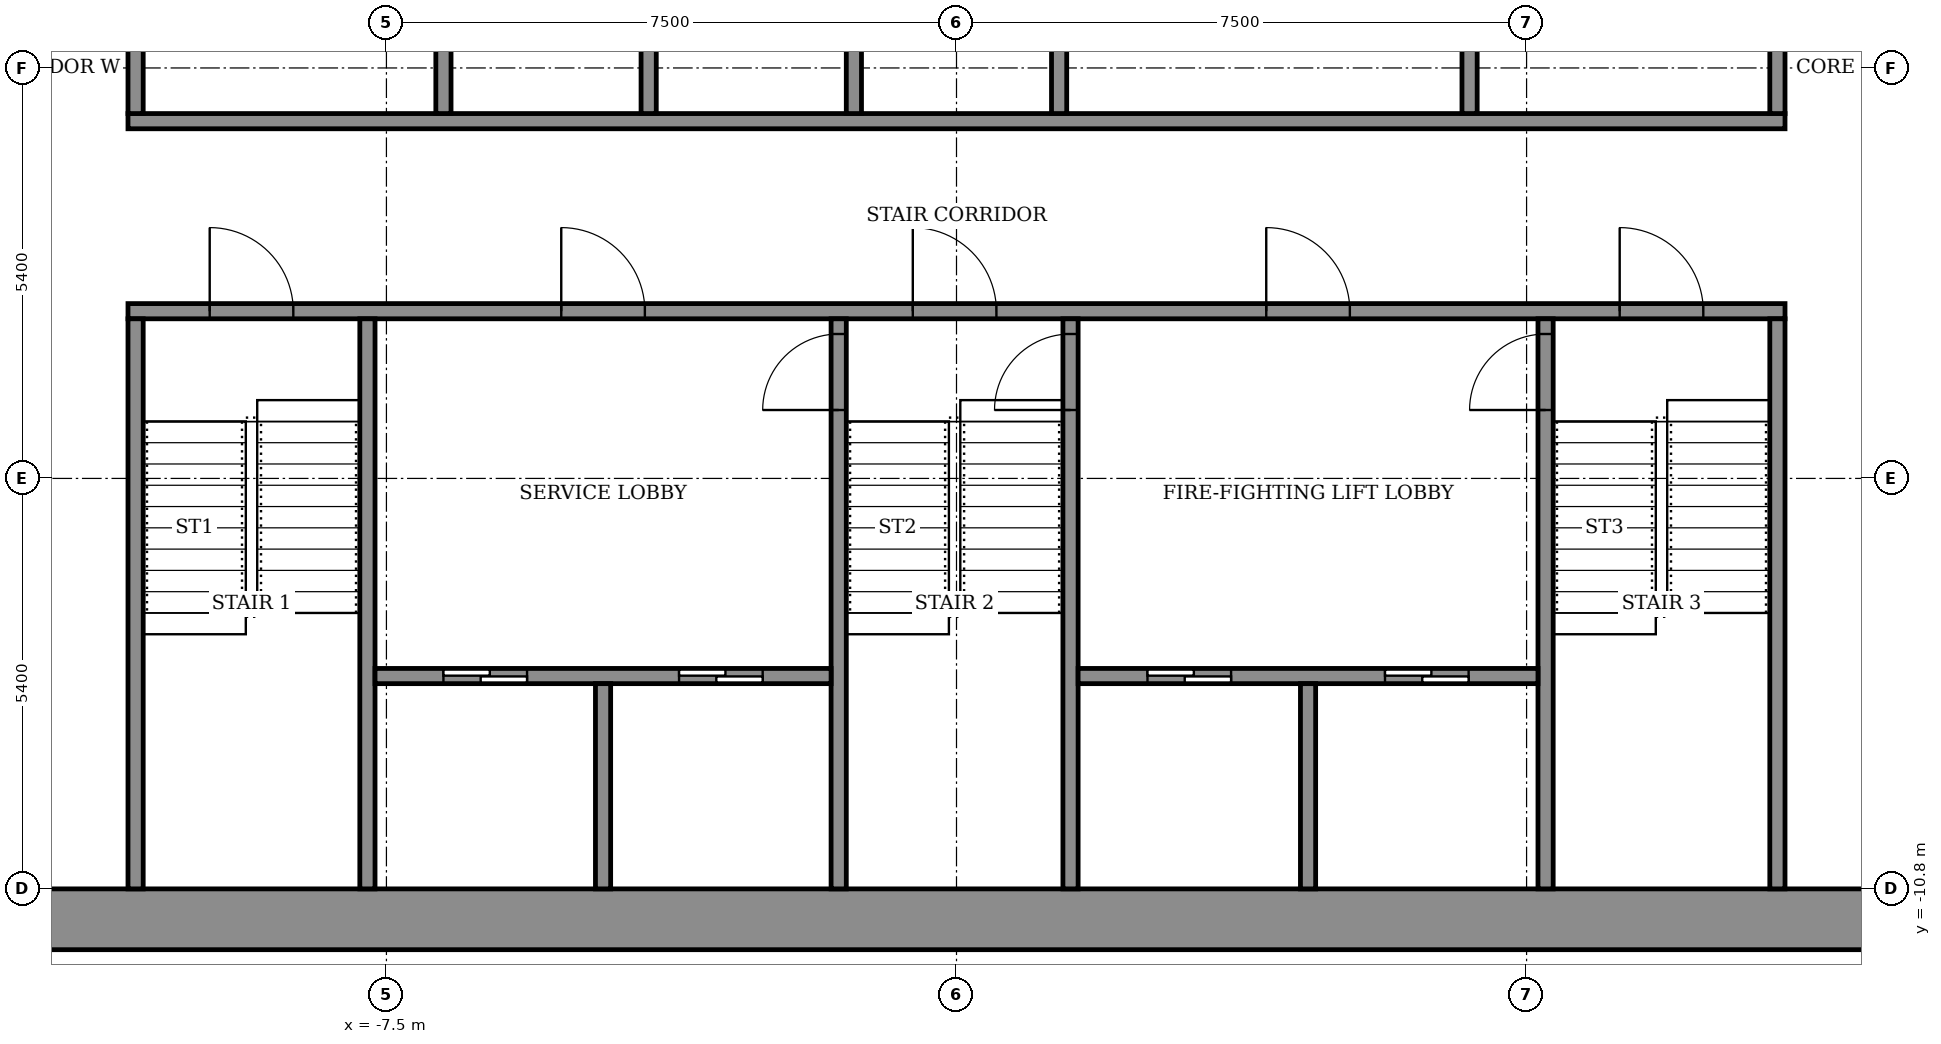
"""IFC4 building model, lengths in metres.
Left out: names, types, materials, properties, quantities, classifications, styles, units other than length and angle.
Written with IfcOpenShell. Run it as: python <this file> out.ifc"""

import sys

from ifc_helpers import new_model, si_unit, direction, frame, frame_2d, origin, place, context, subcontext, project, spatial, rectangle, extrude, element, fill, save


model = new_model("IFC4")
c1 = context("Model", 3, precision=1e-05, world=origin(), true_north=direction((0.0, 1.0)))
c2 = subcontext(c1, "Body", "Model", "MODEL_VIEW")
j1 = project(units=[si_unit("LENGTHUNIT", "METRE"), si_unit("PLANEANGLEUNIT", "RADIAN")], contexts=[c1])
p1 = place(None, origin())
s1 = spatial("IfcSite", under=j1, at=p1, CompositionType="ELEMENT")
p2 = place(p1, origin())
s2 = spatial("IfcBuilding", under=s1, at=p2, CompositionType="ELEMENT")
p3 = place(p2, frame((0.0, 0.0, 245.5)))
s3 = spatial("IfcBuildingStorey", under=s2, at=p3, CompositionType="ELEMENT", Elevation=245.5)
p4 = place(p3, frame((-14.6, -11.2, 0.0), z_axis=(0.0, 0.0, 1.0), x_axis=(1.0, 0.0, 0.0)))
e1 = element("IfcWall", 1, at=p4, inside=s3, PredefinedType="SHEAR", context=c2, shape_type="SweptSolid", body=[
    extrude(rectangle(XDim=29.2, YDim=0.8, at=frame_2d((14.6, 0.0))), origin(), (0.0, 0.0, 1.0), 3.6),
])
p5 = place(p3, frame((-10.9, -3.2, 0.0), z_axis=(0.0, 0.0, 1.0), x_axis=(1.0, 0.0, 0.0)))
e2 = element("IfcWall", 2, at=p5, inside=s3, PredefinedType="SHEAR", context=c2, shape_type="SweptSolid", body=[
    extrude(rectangle(XDim=21.8, YDim=0.2, at=frame_2d((10.9, 0.0))), origin(), (0.0, 0.0, 1.0), 3.05),
])
p6 = place(p5, frame((1.075, 0.0, 0.0)))
e3 = element("IfcOpeningElement", 3, at=p6, cuts=e2, PredefinedType="OPENING", context=c2, shape_type="SweptSolid", body=[
    extrude(rectangle(XDim=1.1, YDim=2.1, at=frame_2d((0.55, 1.05))), frame((0.0, 0.11, 0.0), z_axis=(0.0, -1.0, 0.0), x_axis=(1.0, 0.0, 0.0)), (0.0, 0.0, 1.0), 0.22),
])
p7 = place(p5, frame((10.325, 0.0, 0.0)))
e4 = element("IfcOpeningElement", 4, at=p7, cuts=e2, PredefinedType="OPENING", context=c2, shape_type="SweptSolid", body=[
    extrude(rectangle(XDim=1.1, YDim=2.1, at=frame_2d((0.55, 1.05))), frame((0.0, 0.11, 0.0), z_axis=(0.0, -1.0, 0.0), x_axis=(1.0, 0.0, 0.0)), (0.0, 0.0, 1.0), 0.22),
])
p8 = place(p5, frame((19.625, 0.0, 0.0)))
e5 = element("IfcOpeningElement", 5, at=p8, cuts=e2, PredefinedType="OPENING", context=c2, shape_type="SweptSolid", body=[
    extrude(rectangle(XDim=1.1, YDim=2.1, at=frame_2d((0.55, 1.05))), frame((0.0, 0.11, 0.0), z_axis=(0.0, -1.0, 0.0), x_axis=(1.0, 0.0, 0.0)), (0.0, 0.0, 1.0), 0.22),
])
p9 = place(p5, frame((5.7, 0.0, 0.0)))
e6 = element("IfcOpeningElement", 6, at=p9, cuts=e2, PredefinedType="OPENING", context=c2, shape_type="SweptSolid", body=[
    extrude(rectangle(XDim=1.1, YDim=2.1, at=frame_2d((0.55, 1.05))), frame((0.0, 0.11, 0.0), z_axis=(0.0, -1.0, 0.0), x_axis=(1.0, 0.0, 0.0)), (0.0, 0.0, 1.0), 0.22),
])
p10 = place(p5, frame((14.975, 0.0, 0.0)))
e7 = element("IfcOpeningElement", 7, at=p10, cuts=e2, PredefinedType="OPENING", context=c2, shape_type="SweptSolid", body=[
    extrude(rectangle(XDim=1.1, YDim=2.1, at=frame_2d((0.55, 1.05))), frame((0.0, 0.11, 0.0), z_axis=(0.0, -1.0, 0.0), x_axis=(1.0, 0.0, 0.0)), (0.0, 0.0, 1.0), 0.22),
])
p11 = place(p3, frame((-10.9, -0.7, 0.0), z_axis=(0.0, 0.0, 1.0), x_axis=(1.0, 0.0, 0.0)))
e8 = element("IfcWall", 8, at=p11, inside=s3, PredefinedType="SHEAR", context=c2, shape_type="SweptSolid", body=[
    extrude(rectangle(XDim=21.8, YDim=0.2, at=frame_2d((10.9, 0.0))), origin(), (0.0, 0.0, 1.0), 3.05),
])
for number, where, z_axis, x_axis in (
    (9, (-10.8, -10.8, 0.0), (0.0, 0.0, 1.0), (0.0, 1.0, 0.0)),
    (10, (-7.75, -10.8, 0.0), (0.0, 0.0, 1.0), (0.0, 1.0, 0.0)),
):
    element("IfcWall", number, at=place(p3, frame(where, z_axis=z_axis, x_axis=x_axis)), inside=s3, PredefinedType="SHEAR", context=c2, shape_type="SweptSolid", body=[
        extrude(rectangle(XDim=7.5, YDim=0.2, at=frame_2d((3.75, 0.0))), origin(), (0.0, 0.0, 1.0), 3.05),
    ])
p12 = place(p3, frame((-1.55, -10.8, 0.0), z_axis=(0.0, 0.0, 1.0), x_axis=(0.0, 1.0, 0.0)))
e11 = element("IfcWall", 11, at=p12, inside=s3, PredefinedType="SHEAR", context=c2, shape_type="SweptSolid", body=[
    extrude(rectangle(XDim=7.5, YDim=0.2, at=frame_2d((3.75, 0.0))), origin(), (0.0, 0.0, 1.0), 3.05),
])
p13 = place(p12, frame((6.3, 0.0, 0.0)))
e12 = element("IfcOpeningElement", 12, at=p13, cuts=e11, PredefinedType="OPENING", context=c2, shape_type="SweptSolid", body=[
    extrude(rectangle(XDim=1.0, YDim=2.1, at=frame_2d((0.5, 1.05))), frame((0.0, 0.11, 0.0), z_axis=(0.0, -1.0, 0.0), x_axis=(1.0, 0.0, 0.0)), (0.0, 0.0, 1.0), 0.22),
])
p14 = place(p3, frame((1.5, -10.8, 0.0), z_axis=(0.0, 0.0, 1.0), x_axis=(0.0, 1.0, 0.0)))
e13 = element("IfcWall", 13, at=p14, inside=s3, PredefinedType="SHEAR", context=c2, shape_type="SweptSolid", body=[
    extrude(rectangle(XDim=7.5, YDim=0.2, at=frame_2d((3.75, 0.0))), origin(), (0.0, 0.0, 1.0), 3.05),
])
p15 = place(p14, frame((6.3, 0.0, 0.0)))
e14 = element("IfcOpeningElement", 14, at=p15, cuts=e13, PredefinedType="OPENING", context=c2, shape_type="SweptSolid", body=[
    extrude(rectangle(XDim=1.0, YDim=2.1, at=frame_2d((0.5, 1.05))), frame((0.0, 0.11, 0.0), z_axis=(0.0, -1.0, 0.0), x_axis=(1.0, 0.0, 0.0)), (0.0, 0.0, 1.0), 0.22),
])
p16 = place(p3, frame((7.75, -10.8, 0.0), z_axis=(0.0, 0.0, 1.0), x_axis=(0.0, 1.0, 0.0)))
e15 = element("IfcWall", 15, at=p16, inside=s3, PredefinedType="SHEAR", context=c2, shape_type="SweptSolid", body=[
    extrude(rectangle(XDim=7.5, YDim=0.2, at=frame_2d((3.75, 0.0))), origin(), (0.0, 0.0, 1.0), 3.05),
])
p17 = place(p16, frame((6.3, 0.0, 0.0)))
e16 = element("IfcOpeningElement", 16, at=p17, cuts=e15, PredefinedType="OPENING", context=c2, shape_type="SweptSolid", body=[
    extrude(rectangle(XDim=1.0, YDim=2.1, at=frame_2d((0.5, 1.05))), frame((0.0, 0.11, 0.0), z_axis=(0.0, -1.0, 0.0), x_axis=(1.0, 0.0, 0.0)), (0.0, 0.0, 1.0), 0.22),
])
p18 = place(p3, frame((10.8, -10.8, 0.0), z_axis=(0.0, 0.0, 1.0), x_axis=(0.0, 1.0, 0.0)))
e17 = element("IfcWall", 17, at=p18, inside=s3, PredefinedType="SHEAR", context=c2, shape_type="SweptSolid", body=[
    extrude(rectangle(XDim=7.5, YDim=0.2, at=frame_2d((3.75, 0.0))), origin(), (0.0, 0.0, 1.0), 3.05),
])
p19 = place(p3, frame((-7.65, -8.0, 0.0), z_axis=(0.0, 0.0, 1.0), x_axis=(1.0, 0.0, 0.0)))
e18 = element("IfcWall", 18, at=p19, inside=s3, PredefinedType="SHEAR", context=c2, shape_type="SweptSolid", body=[
    extrude(rectangle(XDim=6.0, YDim=0.2, at=frame_2d((3.0, 0.0))), origin(), (0.0, 0.0, 1.0), 3.05),
])
p20 = place(p19, frame((0.9, 0.0, 0.0)))
e19 = element("IfcOpeningElement", 19, at=p20, cuts=e18, PredefinedType="OPENING", context=c2, shape_type="SweptSolid", body=[
    extrude(rectangle(XDim=1.1, YDim=2.1, at=frame_2d((0.55, 1.05))), frame((0.0, 0.11, 0.0), z_axis=(0.0, -1.0, 0.0), x_axis=(1.0, 0.0, 0.0)), (0.0, 0.0, 1.0), 0.22),
])
p21 = place(p19, frame((4.0, 0.0, 0.0)))
e20 = element("IfcOpeningElement", 20, at=p21, cuts=e18, PredefinedType="OPENING", context=c2, shape_type="SweptSolid", body=[
    extrude(rectangle(XDim=1.1, YDim=2.1, at=frame_2d((0.55, 1.05))), frame((0.0, 0.11, 0.0), z_axis=(0.0, -1.0, 0.0), x_axis=(1.0, 0.0, 0.0)), (0.0, 0.0, 1.0), 0.22),
])
p22 = place(p3, frame((-4.65, -10.8, 0.0), z_axis=(0.0, 0.0, 1.0), x_axis=(0.0, 1.0, 0.0)))
e21 = element("IfcWall", 21, at=p22, inside=s3, PredefinedType="SHEAR", context=c2, shape_type="SweptSolid", body=[
    extrude(rectangle(XDim=2.7, YDim=0.2, at=frame_2d((1.35, 0.0))), origin(), (0.0, 0.0, 1.0), 3.05),
])
p23 = place(p3, frame((1.6, -8.0, 0.0), z_axis=(0.0, 0.0, 1.0), x_axis=(1.0, 0.0, 0.0)))
e22 = element("IfcWall", 22, at=p23, inside=s3, PredefinedType="SHEAR", context=c2, shape_type="SweptSolid", body=[
    extrude(rectangle(XDim=6.05, YDim=0.2, at=frame_2d((3.025, 0.0))), origin(), (0.0, 0.0, 1.0), 3.05),
])
p24 = place(p23, frame((0.913, 0.0, 0.0)))
e23 = element("IfcOpeningElement", 23, at=p24, cuts=e22, PredefinedType="OPENING", context=c2, shape_type="SweptSolid", body=[
    extrude(rectangle(XDim=1.1, YDim=2.1, at=frame_2d((0.55, 1.05))), frame((0.0, 0.11, 0.0), z_axis=(0.0, -1.0, 0.0), x_axis=(1.0, 0.0, 0.0)), (0.0, 0.0, 1.0), 0.22),
])
p25 = place(p23, frame((4.038, 0.0, 0.0)))
e24 = element("IfcOpeningElement", 24, at=p25, cuts=e22, PredefinedType="OPENING", context=c2, shape_type="SweptSolid", body=[
    extrude(rectangle(XDim=1.1, YDim=2.1, at=frame_2d((0.55, 1.05))), frame((0.0, 0.11, 0.0), z_axis=(0.0, -1.0, 0.0), x_axis=(1.0, 0.0, 0.0)), (0.0, 0.0, 1.0), 0.22),
])
p26 = place(p3, frame((4.625, -10.8, 0.0), z_axis=(0.0, 0.0, 1.0), x_axis=(0.0, 1.0, 0.0)))
e25 = element("IfcWall", 25, at=p26, inside=s3, PredefinedType="SHEAR", context=c2, shape_type="SweptSolid", body=[
    extrude(rectangle(XDim=2.7, YDim=0.2, at=frame_2d((1.35, 0.0))), origin(), (0.0, 0.0, 1.0), 3.05),
])
p27 = place(p3, frame((-10.8, -0.6, 0.0), z_axis=(0.0, 0.0, 1.0), x_axis=(0.0, 1.0, 0.0)))
e26 = element("IfcWall", 26, at=p27, inside=s3, PredefinedType="STANDARD", context=c2, shape_type="SweptSolid", body=[
    extrude(rectangle(XDim=2.5, YDim=0.2, at=frame_2d((1.25, 0.0))), origin(), (0.0, 0.0, 1.0), 3.05),
])
for number, where, z_axis, x_axis in (
    (27, (-6.75, -0.6, 0.0), (0.0, 0.0, 1.0), (0.0, 1.0, 0.0)),
    (28, (-4.05, -0.6, 0.0), (0.0, 0.0, 1.0), (0.0, 1.0, 0.0)),
    (29, (-1.35, -0.6, 0.0), (0.0, 0.0, 1.0), (0.0, 1.0, 0.0)),
    (30, (1.35, -0.6, 0.0), (0.0, 0.0, 1.0), (0.0, 1.0, 0.0)),
):
    element("IfcWall", number, at=place(p3, frame(where, z_axis=z_axis, x_axis=x_axis)), inside=s3, PredefinedType="SHEAR", context=c2, shape_type="SweptSolid", body=[
        extrude(rectangle(XDim=2.5, YDim=0.2, at=frame_2d((1.25, 0.0))), origin(), (0.0, 0.0, 1.0), 3.05),
    ])
for number, where, z_axis, x_axis in (
    (31, (6.75, -0.6, 0.0), (0.0, 0.0, 1.0), (0.0, 1.0, 0.0)),
    (32, (10.8, -0.6, 0.0), (0.0, 0.0, 1.0), (0.0, 1.0, 0.0)),
):
    element("IfcWall", number, at=place(p3, frame(where, z_axis=z_axis, x_axis=x_axis)), inside=s3, PredefinedType="STANDARD", context=c2, shape_type="SweptSolid", body=[
        extrude(rectangle(XDim=2.5, YDim=0.2, at=frame_2d((1.25, 0.0))), origin(), (0.0, 0.0, 1.0), 3.05),
    ])
p28 = place(p24, origin())
e33 = element("IfcDoor", 33, at=p28, inside=s3, OperationType="SLIDING_TO_LEFT", PredefinedType="DOOR", context=c2, shape_type="SweptSolid", body=[
    extrude(rectangle(XDim=1.1, YDim=2.1, at=frame_2d((0.55, 1.05))), frame((0.0, 0.025, 0.0), z_axis=(0.0, -1.0, 0.0), x_axis=(1.0, 0.0, 0.0)), (0.0, 0.0, 1.0), 0.05),
])
fill(e23, e33)
p29 = place(p20, origin())
e34 = element("IfcDoor", 34, at=p29, inside=s3, OperationType="SLIDING_TO_LEFT", PredefinedType="DOOR", context=c2, shape_type="SweptSolid", body=[
    extrude(rectangle(XDim=1.1, YDim=2.1, at=frame_2d((0.55, 1.05))), frame((0.0, 0.025, 0.0), z_axis=(0.0, -1.0, 0.0), x_axis=(1.0, 0.0, 0.0)), (0.0, 0.0, 1.0), 0.05),
])
fill(e19, e34)
p30 = place(p25, origin())
e35 = element("IfcDoor", 35, at=p30, inside=s3, OperationType="SLIDING_TO_LEFT", PredefinedType="DOOR", context=c2, shape_type="SweptSolid", body=[
    extrude(rectangle(XDim=1.1, YDim=2.1, at=frame_2d((0.55, 1.05))), frame((0.0, 0.025, 0.0), z_axis=(0.0, -1.0, 0.0), x_axis=(1.0, 0.0, 0.0)), (0.0, 0.0, 1.0), 0.05),
])
fill(e24, e35)
p31 = place(p21, origin())
e36 = element("IfcDoor", 36, at=p31, inside=s3, OperationType="SLIDING_TO_LEFT", PredefinedType="DOOR", context=c2, shape_type="SweptSolid", body=[
    extrude(rectangle(XDim=1.1, YDim=2.1, at=frame_2d((0.55, 1.05))), frame((0.0, 0.025, 0.0), z_axis=(0.0, -1.0, 0.0), x_axis=(1.0, 0.0, 0.0)), (0.0, 0.0, 1.0), 0.05),
])
fill(e20, e36)
p32 = place(p6, origin())
e37 = element("IfcDoor", 37, at=p32, inside=s3, OperationType="SINGLE_SWING_RIGHT", PredefinedType="DOOR", context=c2, shape_type="SweptSolid", body=[
    extrude(rectangle(XDim=1.1, YDim=2.1, at=frame_2d((0.55, 1.05))), frame((0.0, 0.025, 0.0), z_axis=(0.0, -1.0, 0.0), x_axis=(1.0, 0.0, 0.0)), (0.0, 0.0, 1.0), 0.05),
])
fill(e3, e37)
p33 = place(p7, origin())
e38 = element("IfcDoor", 38, at=p33, inside=s3, OperationType="SINGLE_SWING_RIGHT", PredefinedType="DOOR", context=c2, shape_type="SweptSolid", body=[
    extrude(rectangle(XDim=1.1, YDim=2.1, at=frame_2d((0.55, 1.05))), frame((0.0, 0.025, 0.0), z_axis=(0.0, -1.0, 0.0), x_axis=(1.0, 0.0, 0.0)), (0.0, 0.0, 1.0), 0.05),
])
fill(e4, e38)
p34 = place(p8, origin())
e39 = element("IfcDoor", 39, at=p34, inside=s3, OperationType="SINGLE_SWING_RIGHT", PredefinedType="DOOR", context=c2, shape_type="SweptSolid", body=[
    extrude(rectangle(XDim=1.1, YDim=2.1, at=frame_2d((0.55, 1.05))), frame((0.0, 0.025, 0.0), z_axis=(0.0, -1.0, 0.0), x_axis=(1.0, 0.0, 0.0)), (0.0, 0.0, 1.0), 0.05),
])
fill(e5, e39)
p35 = place(p9, origin())
e40 = element("IfcDoor", 40, at=p35, inside=s3, OperationType="SINGLE_SWING_LEFT", PredefinedType="DOOR", context=c2, shape_type="SweptSolid", body=[
    extrude(rectangle(XDim=1.1, YDim=2.1, at=frame_2d((0.55, 1.05))), frame((0.0, 0.025, 0.0), z_axis=(0.0, -1.0, 0.0), x_axis=(1.0, 0.0, 0.0)), (0.0, 0.0, 1.0), 0.05),
])
fill(e6, e40)
p36 = place(p10, origin())
e41 = element("IfcDoor", 41, at=p36, inside=s3, OperationType="SINGLE_SWING_LEFT", PredefinedType="DOOR", context=c2, shape_type="SweptSolid", body=[
    extrude(rectangle(XDim=1.1, YDim=2.1, at=frame_2d((0.55, 1.05))), frame((0.0, 0.025, 0.0), z_axis=(0.0, -1.0, 0.0), x_axis=(1.0, 0.0, 0.0)), (0.0, 0.0, 1.0), 0.05),
])
fill(e7, e41)
p37 = place(p13, origin())
e42 = element("IfcDoor", 42, at=p37, inside=s3, OperationType="SINGLE_SWING_RIGHT", PredefinedType="DOOR", context=c2, shape_type="SweptSolid", body=[
    extrude(rectangle(XDim=1.0, YDim=2.1, at=frame_2d((0.5, 1.05))), frame((0.0, 0.025, 0.0), z_axis=(0.0, -1.0, 0.0), x_axis=(1.0, 0.0, 0.0)), (0.0, 0.0, 1.0), 0.05),
])
fill(e12, e42)
p38 = place(p15, origin())
e43 = element("IfcDoor", 43, at=p38, inside=s3, OperationType="SINGLE_SWING_RIGHT", PredefinedType="DOOR", context=c2, shape_type="SweptSolid", body=[
    extrude(rectangle(XDim=1.0, YDim=2.1, at=frame_2d((0.5, 1.05))), frame((0.0, 0.025, 0.0), z_axis=(0.0, -1.0, 0.0), x_axis=(1.0, 0.0, 0.0)), (0.0, 0.0, 1.0), 0.05),
])
fill(e14, e43)
p39 = place(p17, origin())
e44 = element("IfcDoor", 44, at=p39, inside=s3, OperationType="SINGLE_SWING_RIGHT", PredefinedType="DOOR", context=c2, shape_type="SweptSolid", body=[
    extrude(rectangle(XDim=1.0, YDim=2.1, at=frame_2d((0.5, 1.05))), frame((0.0, 0.025, 0.0), z_axis=(0.0, -1.0, 0.0), x_axis=(1.0, 0.0, 0.0)), (0.0, 0.0, 1.0), 0.05),
])
fill(e16, e44)
save(model, sys.argv[1])
